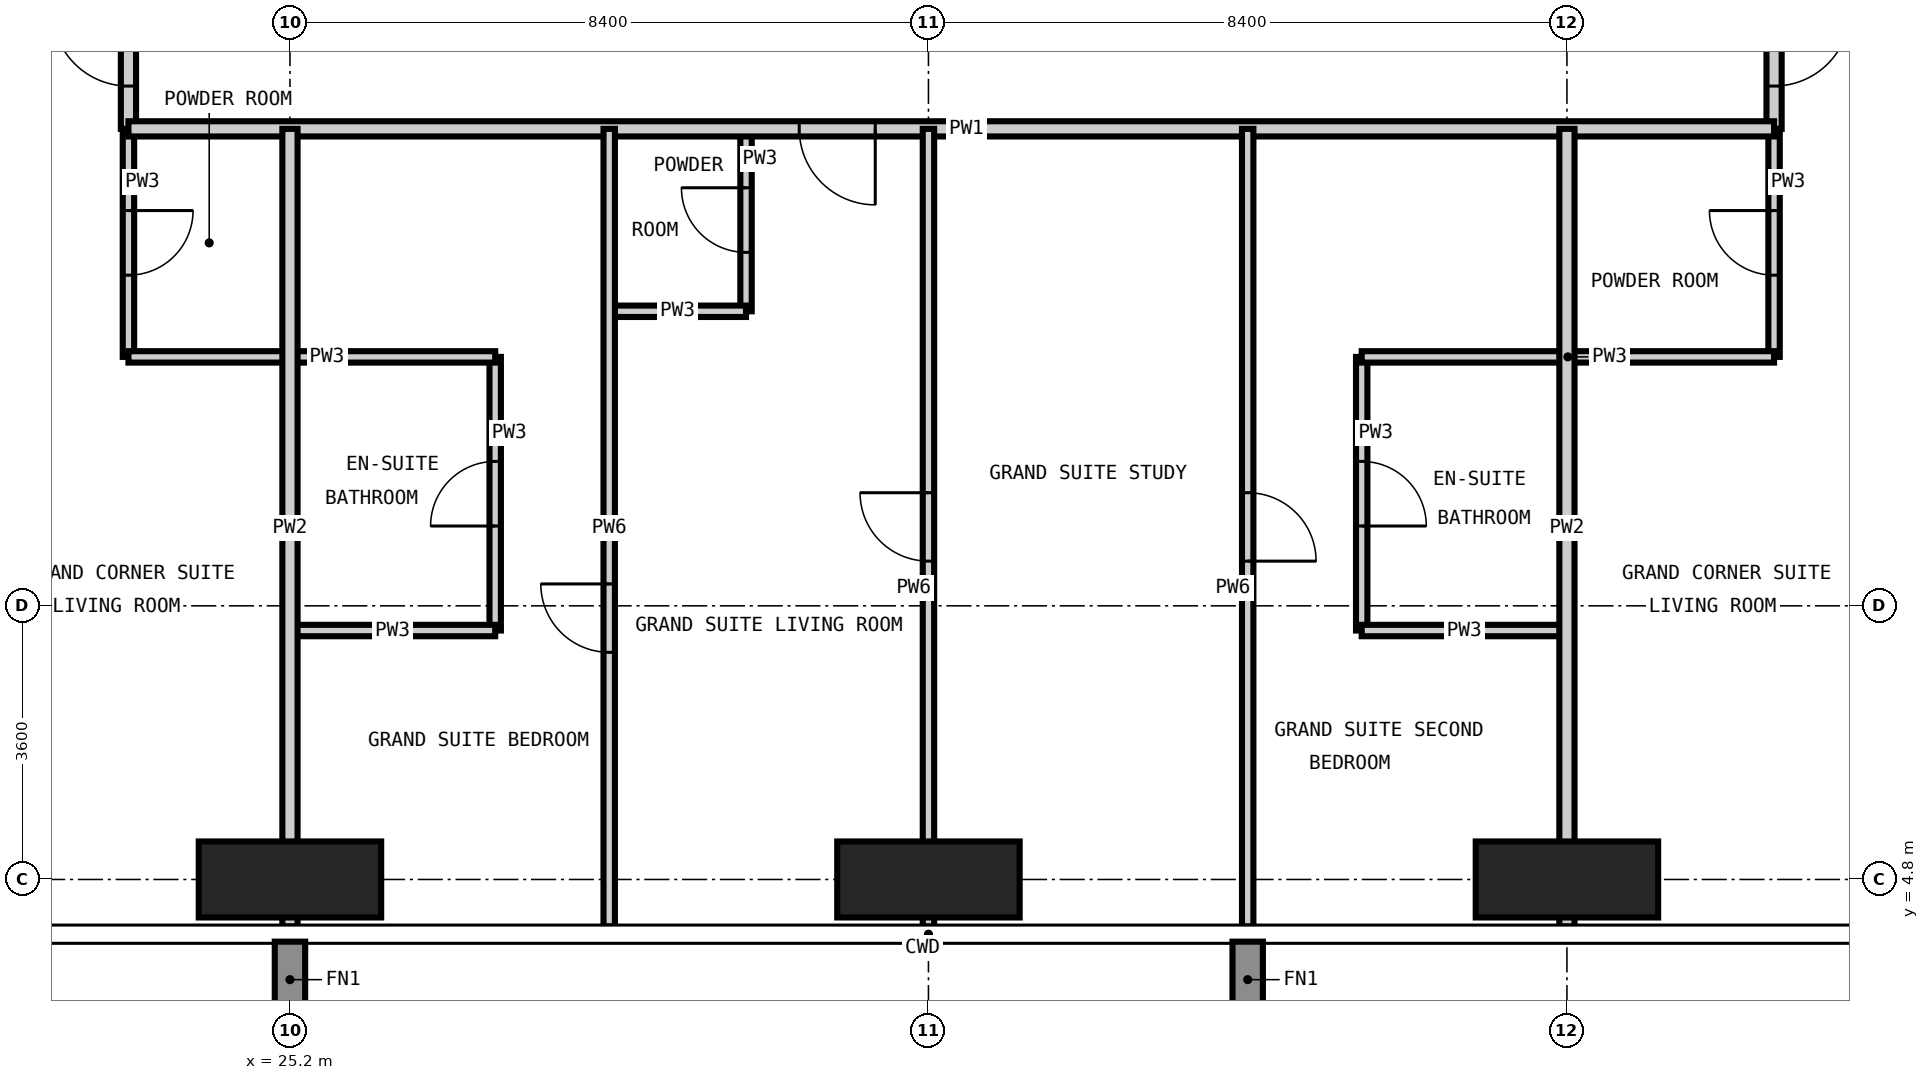
"""IFC4 building model, lengths in metres.
Left out: names, types, materials, properties, quantities, classifications, styles, units other than length and angle.
Written with IfcOpenShell. Run it as: python <this file> out.ifc"""

import sys

from ifc_helpers import new_model, si_unit, direction, frame, frame_2d, origin, origin_2d, place, context, subcontext, project, spatial, rectangle, extrude, element, fill, save


model = new_model("IFC4")
c1 = context("Model", 3, precision=1e-05, world=origin(), true_north=direction((0.0, 1.0)))
c2 = subcontext(c1, "Body", "Model", "MODEL_VIEW")
j1 = project(units=[si_unit("LENGTHUNIT", "METRE"), si_unit("PLANEANGLEUNIT", "RADIAN")], contexts=[c1])
p1 = place(None, origin())
s1 = spatial("IfcSite", under=j1, at=p1, CompositionType="ELEMENT")
p2 = place(p1, origin())
s2 = spatial("IfcBuilding", under=s1, at=p2, CompositionType="ELEMENT")
p3 = place(p2, frame((0.0, 0.0, 252.9)))
s3 = spatial("IfcBuildingStorey", under=s2, at=p3, CompositionType="ELEMENT", Elevation=252.9)
for number, where, z_axis, x_axis in (
    (1, (25.2, 4.8, -0.35), (0.0, 0.0, 1.0), (1.0, 0.0, 0.0)),
    (2, (33.6, 4.8, -0.35), (0.0, 0.0, 1.0), (1.0, 0.0, 0.0)),
    (3, (42.0, 4.8, -0.35), (0.0, 0.0, 1.0), (1.0, 0.0, 0.0)),
):
    element("IfcColumn", number, at=place(p3, frame(where, z_axis=z_axis, x_axis=x_axis)), inside=s3, PredefinedType="COLUMN", context=c2, shape_type="SweptSolid", body=[
        extrude(rectangle(XDim=2.4, YDim=1.0, at=origin_2d()), origin(), (0.0, 0.0, 1.0), 3.9),
    ])
p4 = place(p3, frame((23.075, 11.675, 0.0), z_axis=(0.0, 0.0, 1.0), x_axis=(0.0, 1.0, 0.0)))
e4 = element("IfcWall", 4, at=p4, inside=s3, PredefinedType="PARTITIONING", context=c2, shape_type="SweptSolid", body=[
    extrude(rectangle(XDim=3.0, YDim=0.15, at=frame_2d((1.5, 0.0))), origin(), (0.0, 0.0, 1.0), 3.55),
])
p5 = place(p4, frame((1.075, 0.0, 0.0)))
e5 = element("IfcOpeningElement", 5, at=p5, cuts=e4, PredefinedType="OPENING", context=c2, shape_type="SweptSolid", body=[
    extrude(rectangle(XDim=0.85, YDim=2.1, at=frame_2d((0.425, 1.05))), frame((0.0, 0.085, 0.0), z_axis=(0.0, -1.0, 0.0), x_axis=(1.0, 0.0, 0.0)), (0.0, 0.0, 1.0), 0.17),
])
p6 = place(p3, frame((27.9, 8.075, 0.0), z_axis=(0.0, 0.0, 1.0), x_axis=(0.0, 1.0, 0.0)))
e6 = element("IfcWall", 6, at=p6, inside=s3, PredefinedType="PARTITIONING", context=c2, shape_type="SweptSolid", body=[
    extrude(rectangle(XDim=3.6, YDim=0.15, at=frame_2d((1.8, 0.0))), origin(), (0.0, 0.0, 1.0), 3.55),
])
p7 = place(p6, frame((1.375, 0.0, 0.0)))
e7 = element("IfcOpeningElement", 7, at=p7, cuts=e6, PredefinedType="OPENING", context=c2, shape_type="SweptSolid", body=[
    extrude(rectangle(XDim=0.85, YDim=2.1, at=frame_2d((0.425, 1.05))), frame((0.0, 0.085, 0.0), z_axis=(0.0, -1.0, 0.0), x_axis=(1.0, 0.0, 0.0)), (0.0, 0.0, 1.0), 0.17),
])
p8 = place(p3, frame((31.2, 12.275, 0.0), z_axis=(0.0, 0.0, 1.0), x_axis=(0.0, 1.0, 0.0)))
e8 = element("IfcWall", 8, at=p8, inside=s3, PredefinedType="PARTITIONING", context=c2, shape_type="SweptSolid", body=[
    extrude(rectangle(XDim=2.4, YDim=0.15, at=frame_2d((1.2, 0.0))), origin(), (0.0, 0.0, 1.0), 3.55),
])
p9 = place(p8, frame((0.775, 0.0, 0.0)))
e9 = element("IfcOpeningElement", 9, at=p9, cuts=e8, PredefinedType="OPENING", context=c2, shape_type="SweptSolid", body=[
    extrude(rectangle(XDim=0.85, YDim=2.1, at=frame_2d((0.425, 1.05))), frame((0.0, 0.085, 0.0), z_axis=(0.0, -1.0, 0.0), x_axis=(1.0, 0.0, 0.0)), (0.0, 0.0, 1.0), 0.17),
])
p10 = place(p3, frame((39.3, 8.075, 0.0), z_axis=(0.0, 0.0, 1.0), x_axis=(0.0, 1.0, 0.0)))
e10 = element("IfcWall", 10, at=p10, inside=s3, PredefinedType="PARTITIONING", context=c2, shape_type="SweptSolid", body=[
    extrude(rectangle(XDim=3.6, YDim=0.15, at=frame_2d((1.8, 0.0))), origin(), (0.0, 0.0, 1.0), 3.55),
])
p11 = place(p10, frame((1.375, 0.0, 0.0)))
e11 = element("IfcOpeningElement", 11, at=p11, cuts=e10, PredefinedType="OPENING", context=c2, shape_type="SweptSolid", body=[
    extrude(rectangle(XDim=0.85, YDim=2.1, at=frame_2d((0.425, 1.05))), frame((0.0, 0.085, 0.0), z_axis=(0.0, -1.0, 0.0), x_axis=(1.0, 0.0, 0.0)), (0.0, 0.0, 1.0), 0.17),
])
p12 = place(p3, frame((44.725, 11.675, 0.0), z_axis=(0.0, 0.0, 1.0), x_axis=(0.0, 1.0, 0.0)))
e12 = element("IfcWall", 12, at=p12, inside=s3, PredefinedType="PARTITIONING", context=c2, shape_type="SweptSolid", body=[
    extrude(rectangle(XDim=3.0, YDim=0.15, at=frame_2d((1.5, 0.0))), origin(), (0.0, 0.0, 1.0), 3.55),
])
p13 = place(p12, frame((1.075, 0.0, 0.0)))
e13 = element("IfcOpeningElement", 13, at=p13, cuts=e12, PredefinedType="OPENING", context=c2, shape_type="SweptSolid", body=[
    extrude(rectangle(XDim=0.85, YDim=2.1, at=frame_2d((0.425, 1.05))), frame((0.0, 0.085, 0.0), z_axis=(0.0, -1.0, 0.0), x_axis=(1.0, 0.0, 0.0)), (0.0, 0.0, 1.0), 0.17),
])
for number, where, z_axis, x_axis in (
    (14, (25.2, 8.075, 0.0), (0.0, 0.0, 1.0), (1.0, 0.0, 0.0)),
    (15, (39.3, 8.075, 0.0), (0.0, 0.0, 1.0), (1.0, 0.0, 0.0)),
):
    element("IfcWall", number, at=place(p3, frame(where, z_axis=z_axis, x_axis=x_axis)), inside=s3, PredefinedType="PARTITIONING", context=c2, shape_type="SweptSolid", body=[
        extrude(rectangle(XDim=2.7, YDim=0.15, at=frame_2d((1.35, 0.0))), origin(), (0.0, 0.0, 1.0), 3.55),
    ])
p14 = place(p3, frame((23.075, 11.675, 0.0), z_axis=(0.0, 0.0, 1.0), x_axis=(1.0, 0.0, 0.0)))
e16 = element("IfcWall", 16, at=p14, inside=s3, PredefinedType="PARTITIONING", context=c2, shape_type="SweptSolid", body=[
    extrude(rectangle(XDim=4.825, YDim=0.15, at=frame_2d((2.413, 0.0))), origin(), (0.0, 0.0, 1.0), 3.55),
])
p15 = place(p3, frame((39.3, 11.675, 0.0), z_axis=(0.0, 0.0, 1.0), x_axis=(1.0, 0.0, 0.0)))
e17 = element("IfcWall", 17, at=p15, inside=s3, PredefinedType="PARTITIONING", context=c2, shape_type="SweptSolid", body=[
    extrude(rectangle(XDim=5.425, YDim=0.15, at=frame_2d((2.712, 0.0))), origin(), (0.0, 0.0, 1.0), 3.55),
])
p16 = place(p3, frame((29.4, 12.275, 0.0), z_axis=(0.0, 0.0, 1.0), x_axis=(1.0, 0.0, 0.0)))
e18 = element("IfcWall", 18, at=p16, inside=s3, PredefinedType="PARTITIONING", context=c2, shape_type="SweptSolid", body=[
    extrude(rectangle(XDim=1.8, YDim=0.15, at=frame_2d((0.9, 0.0))), origin(), (0.0, 0.0, 1.0), 3.55),
])
p17 = place(p3, frame((23.075, 14.675, 0.0), z_axis=(0.0, 0.0, 1.0), x_axis=(0.0, 1.0, 0.0)))
e19 = element("IfcWall", 19, at=p17, inside=s3, PredefinedType="PARTITIONING", context=c2, shape_type="SweptSolid", body=[
    extrude(rectangle(XDim=30.65, YDim=0.2, at=frame_2d((15.325, 0.0))), origin(), (0.0, 0.0, 1.0), 3.55),
])
p18 = place(p17, frame((4.925, 0.0, 0.0)))
e20 = element("IfcOpeningElement", 20, at=p18, cuts=e19, PredefinedType="OPENING", context=c2, shape_type="SweptSolid", body=[
    extrude(rectangle(XDim=1.0, YDim=2.2, at=frame_2d((0.5, 1.1))), frame((0.0, 0.11, 0.0), z_axis=(0.0, -1.0, 0.0), x_axis=(1.0, 0.0, 0.0)), (0.0, 0.0, 1.0), 0.22),
])
p19 = place(p17, frame((15.125, 0.0, 0.0)))
e21 = element("IfcOpeningElement", 21, at=p19, cuts=e19, PredefinedType="OPENING", context=c2, shape_type="SweptSolid", body=[
    extrude(rectangle(XDim=1.0, YDim=2.2, at=frame_2d((0.5, 1.1))), frame((0.0, 0.11, 0.0), z_axis=(0.0, -1.0, 0.0), x_axis=(1.0, 0.0, 0.0)), (0.0, 0.0, 1.0), 0.22),
])
p20 = place(p17, frame((21.725, 0.0, 0.0)))
e22 = element("IfcOpeningElement", 22, at=p20, cuts=e19, PredefinedType="OPENING", context=c2, shape_type="SweptSolid", body=[
    extrude(rectangle(XDim=1.0, YDim=2.2, at=frame_2d((0.5, 1.1))), frame((0.0, 0.11, 0.0), z_axis=(0.0, -1.0, 0.0), x_axis=(1.0, 0.0, 0.0)), (0.0, 0.0, 1.0), 0.22),
])
p21 = place(p17, frame((0.563, 0.0, 0.0)))
e23 = element("IfcOpeningElement", 23, at=p21, cuts=e19, PredefinedType="OPENING", context=c2, shape_type="SweptSolid", body=[
    extrude(rectangle(XDim=1.0, YDim=2.2, at=frame_2d((0.5, 1.1))), frame((0.0, 0.11, 0.0), z_axis=(0.0, -1.0, 0.0), x_axis=(1.0, 0.0, 0.0)), (0.0, 0.0, 1.0), 0.22),
])
p22 = place(p17, frame((28.488, 0.0, 0.0)))
e24 = element("IfcOpeningElement", 24, at=p22, cuts=e19, PredefinedType="OPENING", context=c2, shape_type="SweptSolid", body=[
    extrude(rectangle(XDim=1.0, YDim=2.2, at=frame_2d((0.5, 1.1))), frame((0.0, 0.11, 0.0), z_axis=(0.0, -1.0, 0.0), x_axis=(1.0, 0.0, 0.0)), (0.0, 0.0, 1.0), 0.22),
])
p23 = place(p3, frame((44.725, 29.4, 0.0), z_axis=(0.0, 0.0, 1.0), x_axis=(0.0, -1.0, 0.0)))
e25 = element("IfcWall", 25, at=p23, inside=s3, PredefinedType="PARTITIONING", context=c2, shape_type="SweptSolid", body=[
    extrude(rectangle(XDim=14.725, YDim=0.2, at=frame_2d((7.362, 0.0))), origin(), (0.0, 0.0, 1.0), 3.55),
])
p24 = place(p23, frame((5.8, 0.0, 0.0)))
e26 = element("IfcOpeningElement", 26, at=p24, cuts=e25, PredefinedType="OPENING", context=c2, shape_type="SweptSolid", body=[
    extrude(rectangle(XDim=1.0, YDim=2.2, at=frame_2d((0.5, 1.1))), frame((0.0, 0.11, 0.0), z_axis=(0.0, -1.0, 0.0), x_axis=(1.0, 0.0, 0.0)), (0.0, 0.0, 1.0), 0.22),
])
p25 = place(p23, frame((13.162, 0.0, 0.0)))
e27 = element("IfcOpeningElement", 27, at=p25, cuts=e25, PredefinedType="OPENING", context=c2, shape_type="SweptSolid", body=[
    extrude(rectangle(XDim=1.0, YDim=2.2, at=frame_2d((0.5, 1.1))), frame((0.0, 0.11, 0.0), z_axis=(0.0, -1.0, 0.0), x_axis=(1.0, 0.0, 0.0)), (0.0, 0.0, 1.0), 0.22),
])
p26 = place(p3, frame((44.725, 14.675, 0.0), z_axis=(0.0, 0.0, 1.0), x_axis=(-1.0, 0.0, 0.0)))
e28 = element("IfcWall", 28, at=p26, inside=s3, PredefinedType="PARTITIONING", context=c2, shape_type="SweptSolid", body=[
    extrude(rectangle(XDim=21.65, YDim=0.2, at=frame_2d((10.825, 0.0))), origin(), (0.0, 0.0, 1.0), 3.55),
])
p27 = place(p26, frame((11.825, 0.0, 0.0)))
e29 = element("IfcOpeningElement", 29, at=p27, cuts=e28, PredefinedType="OPENING", context=c2, shape_type="SweptSolid", body=[
    extrude(rectangle(XDim=1.0, YDim=2.2, at=frame_2d((0.5, 1.1))), frame((0.0, 0.11, 0.0), z_axis=(0.0, -1.0, 0.0), x_axis=(1.0, 0.0, 0.0)), (0.0, 0.0, 1.0), 0.22),
])
for number, where, z_axis, x_axis in (
    (30, (25.2, 4.182, 0.0), (0.0, 0.0, 1.0), (0.0, 1.0, 0.0)),
    (31, (42.0, 4.182, 0.0), (0.0, 0.0, 1.0), (0.0, 1.0, 0.0)),
):
    element("IfcWall", number, at=place(p3, frame(where, z_axis=z_axis, x_axis=x_axis)), inside=s3, PredefinedType="PARTITIONING", context=c2, shape_type="SweptSolid", body=[
        extrude(rectangle(XDim=10.493, YDim=0.2, at=frame_2d((5.247, 0.0))), origin(), (0.0, 0.0, 1.0), 3.55),
    ])
p28 = place(p3, frame((29.4, 4.182, 0.0), z_axis=(0.0, 0.0, 1.0), x_axis=(0.0, 1.0, 0.0)))
e32 = element("IfcWall", 32, at=p28, inside=s3, PredefinedType="PARTITIONING", context=c2, shape_type="SweptSolid", body=[
    extrude(rectangle(XDim=10.493, YDim=0.15, at=frame_2d((5.247, 0.0))), origin(), (0.0, 0.0, 1.0), 3.55),
])
p29 = place(p28, frame((3.606, 0.0, 0.0)))
e33 = element("IfcOpeningElement", 33, at=p29, cuts=e32, PredefinedType="OPENING", context=c2, shape_type="SweptSolid", body=[
    extrude(rectangle(XDim=0.9, YDim=2.1, at=frame_2d((0.45, 1.05))), frame((0.0, 0.085, 0.0), z_axis=(0.0, -1.0, 0.0), x_axis=(1.0, 0.0, 0.0)), (0.0, 0.0, 1.0), 0.17),
])
p30 = place(p3, frame((33.6, 4.182, 0.0), z_axis=(0.0, 0.0, 1.0), x_axis=(0.0, 1.0, 0.0)))
e34 = element("IfcWall", 34, at=p30, inside=s3, PredefinedType="PARTITIONING", context=c2, shape_type="SweptSolid", body=[
    extrude(rectangle(XDim=10.493, YDim=0.15, at=frame_2d((5.247, 0.0))), origin(), (0.0, 0.0, 1.0), 3.55),
])
p31 = place(p30, frame((4.806, 0.0, 0.0)))
e35 = element("IfcOpeningElement", 35, at=p31, cuts=e34, PredefinedType="OPENING", context=c2, shape_type="SweptSolid", body=[
    extrude(rectangle(XDim=0.9, YDim=2.1, at=frame_2d((0.45, 1.05))), frame((0.0, 0.085, 0.0), z_axis=(0.0, -1.0, 0.0), x_axis=(1.0, 0.0, 0.0)), (0.0, 0.0, 1.0), 0.17),
])
p32 = place(p3, frame((37.8, 4.182, 0.0), z_axis=(0.0, 0.0, 1.0), x_axis=(0.0, 1.0, 0.0)))
e36 = element("IfcWall", 36, at=p32, inside=s3, PredefinedType="PARTITIONING", context=c2, shape_type="SweptSolid", body=[
    extrude(rectangle(XDim=10.493, YDim=0.15, at=frame_2d((5.247, 0.0))), origin(), (0.0, 0.0, 1.0), 3.55),
])
p33 = place(p32, frame((4.806, 0.0, 0.0)))
e37 = element("IfcOpeningElement", 37, at=p33, cuts=e36, PredefinedType="OPENING", context=c2, shape_type="SweptSolid", body=[
    extrude(rectangle(XDim=0.9, YDim=2.1, at=frame_2d((0.45, 1.05))), frame((0.0, 0.085, 0.0), z_axis=(0.0, -1.0, 0.0), x_axis=(1.0, 0.0, 0.0)), (0.0, 0.0, 1.0), 0.17),
])
p34 = place(p27, origin())
e38 = element("IfcDoor", 38, at=p34, inside=s3, OperationType="SINGLE_SWING_LEFT", PredefinedType="DOOR", context=c2, shape_type="SweptSolid", body=[
    extrude(rectangle(XDim=1.0, YDim=2.2, at=frame_2d((0.5, 1.1))), frame((0.0, 0.025, 0.0), z_axis=(0.0, -1.0, 0.0), x_axis=(1.0, 0.0, 0.0)), (0.0, 0.0, 1.0), 0.05),
])
fill(e29, e38)
p35 = place(p9, origin())
e39 = element("IfcDoor", 39, at=p35, inside=s3, OperationType="SINGLE_SWING_RIGHT", PredefinedType="DOOR", context=c2, shape_type="SweptSolid", body=[
    extrude(rectangle(XDim=0.85, YDim=2.1, at=frame_2d((0.425, 1.05))), frame((0.0, 0.025, 0.0), z_axis=(0.0, -1.0, 0.0), x_axis=(1.0, 0.0, 0.0)), (0.0, 0.0, 1.0), 0.05),
])
fill(e9, e39)
p36 = place(p29, origin())
e40 = element("IfcDoor", 40, at=p36, inside=s3, OperationType="SINGLE_SWING_RIGHT", PredefinedType="DOOR", context=c2, shape_type="SweptSolid", body=[
    extrude(rectangle(XDim=0.9, YDim=2.1, at=frame_2d((0.45, 1.05))), frame((0.0, 0.025, 0.0), z_axis=(0.0, -1.0, 0.0), x_axis=(1.0, 0.0, 0.0)), (0.0, 0.0, 1.0), 0.05),
])
fill(e33, e40)
p37 = place(p7, origin())
e41 = element("IfcDoor", 41, at=p37, inside=s3, OperationType="SINGLE_SWING_LEFT", PredefinedType="DOOR", context=c2, shape_type="SweptSolid", body=[
    extrude(rectangle(XDim=0.85, YDim=2.1, at=frame_2d((0.425, 1.05))), frame((0.0, 0.025, 0.0), z_axis=(0.0, -1.0, 0.0), x_axis=(1.0, 0.0, 0.0)), (0.0, 0.0, 1.0), 0.05),
])
fill(e7, e41)
p38 = place(p31, origin())
e42 = element("IfcDoor", 42, at=p38, inside=s3, OperationType="SINGLE_SWING_RIGHT", PredefinedType="DOOR", context=c2, shape_type="SweptSolid", body=[
    extrude(rectangle(XDim=0.9, YDim=2.1, at=frame_2d((0.45, 1.05))), frame((0.0, 0.025, 0.0), z_axis=(0.0, -1.0, 0.0), x_axis=(1.0, 0.0, 0.0)), (0.0, 0.0, 1.0), 0.05),
])
fill(e35, e42)
p39 = place(p33, frame((0.9, 0.0, 0.0), z_axis=(0.0, 0.0, 1.0), x_axis=(-1.0, 0.0, 0.0)))
e43 = element("IfcDoor", 43, at=p39, inside=s3, OperationType="SINGLE_SWING_RIGHT", PredefinedType="DOOR", context=c2, shape_type="SweptSolid", body=[
    extrude(rectangle(XDim=0.9, YDim=2.1, at=frame_2d((0.45, 1.05))), frame((0.0, 0.025, 0.0), z_axis=(0.0, -1.0, 0.0), x_axis=(1.0, 0.0, 0.0)), (0.0, 0.0, 1.0), 0.05),
])
fill(e37, e43)
p40 = place(p11, frame((0.85, 0.0, 0.0), z_axis=(0.0, 0.0, 1.0), x_axis=(-1.0, 0.0, 0.0)))
e44 = element("IfcDoor", 44, at=p40, inside=s3, OperationType="SINGLE_SWING_RIGHT", PredefinedType="DOOR", context=c2, shape_type="SweptSolid", body=[
    extrude(rectangle(XDim=0.85, YDim=2.1, at=frame_2d((0.425, 1.05))), frame((0.0, 0.025, 0.0), z_axis=(0.0, -1.0, 0.0), x_axis=(1.0, 0.0, 0.0)), (0.0, 0.0, 1.0), 0.05),
])
fill(e11, e44)
p41 = place(p21, origin())
e45 = element("IfcDoor", 45, at=p41, inside=s3, OperationType="SINGLE_SWING_RIGHT", PredefinedType="DOOR", context=c2, shape_type="SweptSolid", body=[
    extrude(rectangle(XDim=1.0, YDim=2.2, at=frame_2d((0.5, 1.1))), frame((0.0, 0.025, 0.0), z_axis=(0.0, -1.0, 0.0), x_axis=(1.0, 0.0, 0.0)), (0.0, 0.0, 1.0), 0.05),
])
fill(e23, e45)
p42 = place(p5, frame((0.85, 0.0, 0.0), z_axis=(0.0, 0.0, 1.0), x_axis=(-1.0, 0.0, 0.0)))
e46 = element("IfcDoor", 46, at=p42, inside=s3, OperationType="SINGLE_SWING_LEFT", PredefinedType="DOOR", context=c2, shape_type="SweptSolid", body=[
    extrude(rectangle(XDim=0.85, YDim=2.1, at=frame_2d((0.425, 1.05))), frame((0.0, 0.025, 0.0), z_axis=(0.0, -1.0, 0.0), x_axis=(1.0, 0.0, 0.0)), (0.0, 0.0, 1.0), 0.05),
])
fill(e5, e46)
p43 = place(p25, origin())
e47 = element("IfcDoor", 47, at=p43, inside=s3, OperationType="SINGLE_SWING_LEFT", PredefinedType="DOOR", context=c2, shape_type="SweptSolid", body=[
    extrude(rectangle(XDim=1.0, YDim=2.2, at=frame_2d((0.5, 1.1))), frame((0.0, 0.025, 0.0), z_axis=(0.0, -1.0, 0.0), x_axis=(1.0, 0.0, 0.0)), (0.0, 0.0, 1.0), 0.05),
])
fill(e27, e47)
p44 = place(p13, origin())
e48 = element("IfcDoor", 48, at=p44, inside=s3, OperationType="SINGLE_SWING_RIGHT", PredefinedType="DOOR", context=c2, shape_type="SweptSolid", body=[
    extrude(rectangle(XDim=0.85, YDim=2.1, at=frame_2d((0.425, 1.05))), frame((0.0, 0.025, 0.0), z_axis=(0.0, -1.0, 0.0), x_axis=(1.0, 0.0, 0.0)), (0.0, 0.0, 1.0), 0.05),
])
fill(e13, e48)
save(model, sys.argv[1])
